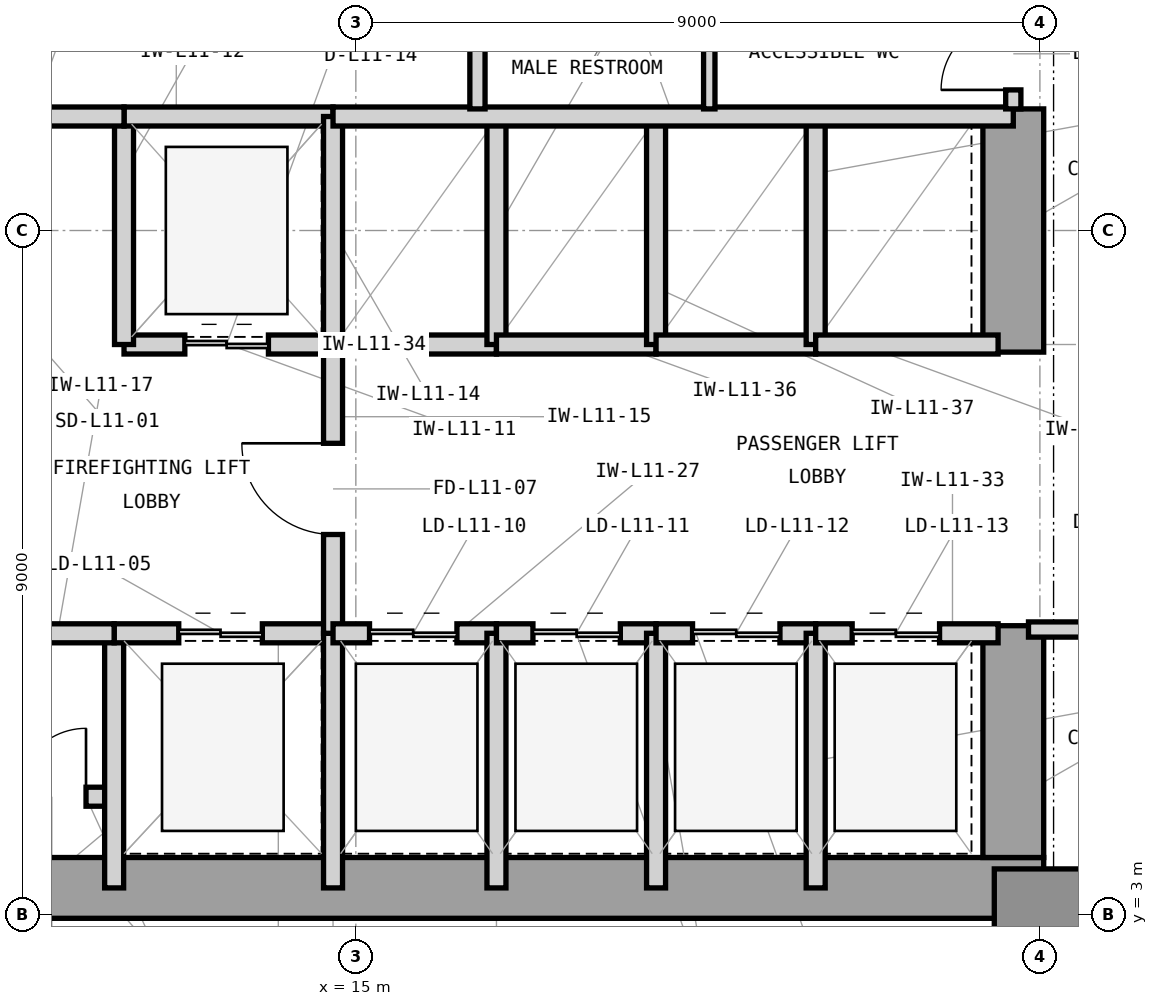
"""IFC4 building model, lengths in metres.
Left out: names, types, materials, properties, quantities, classifications, styles, units other than length and angle.
Written with IfcOpenShell. Run it as: python <this file> out.ifc"""

import sys

from ifc_helpers import new_model, si_unit, direction, frame, frame_2d, origin, origin_2d, place, context, subcontext, project, spatial, rectangle, extrude, element, fill, save


model = new_model("IFC4")
c1 = context("Model", 3, precision=1e-05, world=origin(), true_north=direction((0.0, 1.0)))
c2 = subcontext(c1, "Body", "Model", "MODEL_VIEW")
j1 = project(units=[si_unit("LENGTHUNIT", "METRE"), si_unit("PLANEANGLEUNIT", "RADIAN")], contexts=[c1])
p1 = place(None, origin())
s1 = spatial("IfcSite", under=j1, at=p1, CompositionType="ELEMENT")
p2 = place(p1, origin())
s2 = spatial("IfcBuilding", under=s1, at=p2, CompositionType="ELEMENT")
p3 = place(p2, frame((0.0, 0.0, 51.0)))
s3 = spatial("IfcBuildingStorey", under=s2, at=p3, CompositionType="ELEMENT", Elevation=51.0)
p4 = place(p3, frame((7.475, 3.35, 0.0), z_axis=(0.0, 0.0, 1.0), x_axis=(1.0, 0.0, 0.0)))
e1 = element("IfcWall", 1, at=p4, inside=s3, PredefinedType="SHEAR", context=c2, shape_type="SweptSolid", body=[
    extrude(rectangle(XDim=16.575, YDim=0.8, at=frame_2d((8.288, 0.0))), origin(), (0.0, 0.0, 1.0), 4.2),
])
p5 = place(p3, frame((23.65, 3.75, 0.0), z_axis=(0.0, 0.0, 1.0), x_axis=(0.0, 1.0, 0.0)))
e2 = element("IfcWall", 2, at=p5, inside=s3, PredefinedType="SHEAR", context=c2, shape_type="SweptSolid", body=[
    extrude(rectangle(XDim=3.05, YDim=0.8, at=frame_2d((1.525, 0.0))), origin(), (0.0, 0.0, 1.0), 4.2),
])
p6 = place(p3, frame((23.65, 10.4, 0.0), z_axis=(0.0, 0.0, 1.0), x_axis=(0.0, 1.0, 0.0)))
e3 = element("IfcWall", 3, at=p6, inside=s3, PredefinedType="SHEAR", context=c2, shape_type="SweptSolid", body=[
    extrude(rectangle(XDim=3.2, YDim=0.8, at=frame_2d((1.6, 0.0))), origin(), (0.0, 0.0, 1.0), 4.2),
])
p7 = place(p3, frame((24.0, 3.0, 0.0), z_axis=(0.0, 0.0, 1.0), x_axis=(1.0, 0.0, 0.0)))
e4 = element("IfcColumn", 4, at=p7, inside=s3, PredefinedType="COLUMN", context=c2, shape_type="SweptSolid", body=[
    extrude(rectangle(XDim=1.2, YDim=1.2, at=origin_2d()), origin(), (0.0, 0.0, 1.0), 4.2),
])
p8 = place(p3, frame((23.9, 3.21, 0.0), z_axis=(0.0, 0.0, 1.0), x_axis=(1.0, 0.0, 0.0)))
e5 = element("IfcWall", 5, at=p8, inside=s3, PredefinedType="STANDARD", context=c2, shape_type="SweptSolid", body=[
    extrude(rectangle(XDim=40.5, YDim=0.42, at=frame_2d((20.25, 0.0))), origin(), (0.0, 0.0, 1.0), 3.98),
])
p9 = place(p8, frame((1.1, 0.0, 0.85)))
e6 = element("IfcOpeningElement", 6, at=p9, cuts=e5, PredefinedType="OPENING", context=c2, shape_type="SweptSolid", body=[
    extrude(rectangle(XDim=1.2, YDim=2.45, at=frame_2d((0.6, 1.225))), frame((0.0, 0.22, 0.0), z_axis=(0.0, -1.0, 0.0), x_axis=(1.0, 0.0, 0.0)), (0.0, 0.0, 1.0), 0.44),
])
p10 = place(p8, frame((5.336, 0.0, 0.85)))
e7 = element("IfcOpeningElement", 7, at=p10, cuts=e5, PredefinedType="OPENING", context=c2, shape_type="SweptSolid", body=[
    extrude(rectangle(XDim=2.8, YDim=2.45, at=frame_2d((1.4, 1.225))), frame((0.0, 0.22, 0.0), z_axis=(0.0, -1.0, 0.0), x_axis=(1.0, 0.0, 0.0)), (0.0, 0.0, 1.0), 0.44),
])
p11 = place(p8, frame((19.086, 0.0, 0.85)))
e8 = element("IfcOpeningElement", 8, at=p11, cuts=e5, PredefinedType="OPENING", context=c2, shape_type="SweptSolid", body=[
    extrude(rectangle(XDim=2.8, YDim=2.45, at=frame_2d((1.4, 1.225))), frame((0.0, 0.22, 0.0), z_axis=(0.0, -1.0, 0.0), x_axis=(1.0, 0.0, 0.0)), (0.0, 0.0, 1.0), 0.44),
])
p12 = place(p8, frame((27.886, 0.0, 0.85)))
e9 = element("IfcOpeningElement", 9, at=p12, cuts=e5, PredefinedType="OPENING", context=c2, shape_type="SweptSolid", body=[
    extrude(rectangle(XDim=1.2, YDim=2.45, at=frame_2d((0.6, 1.225))), frame((0.0, 0.22, 0.0), z_axis=(0.0, -1.0, 0.0), x_axis=(1.0, 0.0, 0.0)), (0.0, 0.0, 1.0), 0.44),
])
p13 = place(p3, frame((10.33, 4.55, 0.0), z_axis=(0.0, 0.0, 1.0), x_axis=(1.0, 0.0, 0.0)))
e10 = element("IfcWall", 10, at=p13, inside=s3, PredefinedType="PARTITIONING", context=c2, shape_type="SweptSolid", body=[
    extrude(rectangle(XDim=1.49, YDim=0.25, at=frame_2d((0.745, 0.0))), origin(), (0.0, 0.0, 1.0), 3.97),
])
p14 = place(p13, frame((0.22, 0.0, 0.0)))
e11 = element("IfcOpeningElement", 11, at=p14, cuts=e10, PredefinedType="OPENING", context=c2, shape_type="SweptSolid", body=[
    extrude(rectangle(XDim=0.9, YDim=2.1, at=frame_2d((0.45, 1.05))), frame((0.0, 0.135, 0.0), z_axis=(0.0, -1.0, 0.0), x_axis=(1.0, 0.0, 0.0)), (0.0, 0.0, 1.0), 0.27),
])
p15 = place(p3, frame((11.82, 3.35, 0.0), z_axis=(0.0, 0.0, 1.0), x_axis=(0.0, 1.0, 0.0)))
e12 = element("IfcWall", 12, at=p15, inside=s3, PredefinedType="PARTITIONING", context=c2, shape_type="SweptSolid", body=[
    extrude(rectangle(XDim=3.35, YDim=0.25, at=frame_2d((1.675, 0.0))), origin(), (0.0, 0.0, 1.0), 3.97),
])
p16 = place(p3, frame((11.82, 6.7, 0.0), z_axis=(0.0, 0.0, 1.0), x_axis=(1.0, 0.0, 0.0)))
e13 = element("IfcWall", 13, at=p16, inside=s3, PredefinedType="PARTITIONING", context=c2, shape_type="SweptSolid", body=[
    extrude(rectangle(XDim=2.88, YDim=0.25, at=frame_2d((1.44, 0.0))), origin(), (0.0, 0.0, 1.0), 3.426),
])
p17 = place(p16, frame((0.85, 0.0, 0.0)))
e14 = element("IfcOpeningElement", 14, at=p17, cuts=e13, PredefinedType="OPENING", context=c2, shape_type="SweptSolid", body=[
    extrude(rectangle(XDim=1.1, YDim=2.25, at=frame_2d((0.55, 1.125))), frame((0.0, 0.135, 0.0), z_axis=(0.0, -1.0, 0.0), x_axis=(1.0, 0.0, 0.0)), (0.0, 0.0, 1.0), 0.27),
])
p18 = place(p3, frame((14.7, 3.35, 0.0), z_axis=(0.0, 0.0, 1.0), x_axis=(0.0, 1.0, 0.0)))
e15 = element("IfcWall", 15, at=p18, inside=s3, PredefinedType="PARTITIONING", context=c2, shape_type="SweptSolid", body=[
    extrude(rectangle(XDim=3.35, YDim=0.25, at=frame_2d((1.675, 0.0))), origin(), (0.0, 0.0, 1.0), 3.97),
])
p19 = place(p3, frame((11.95, 10.5, 0.0), z_axis=(0.0, 0.0, 1.0), x_axis=(1.0, 0.0, 0.0)))
e16 = element("IfcWall", 16, at=p19, inside=s3, PredefinedType="PARTITIONING", context=c2, shape_type="SweptSolid", body=[
    extrude(rectangle(XDim=2.75, YDim=0.25, at=frame_2d((1.375, 0.0))), origin(), (0.0, 0.0, 1.0), 3.426),
])
p20 = place(p19, frame((0.8, 0.0, 0.0)))
e17 = element("IfcOpeningElement", 17, at=p20, cuts=e16, PredefinedType="OPENING", context=c2, shape_type="SweptSolid", body=[
    extrude(rectangle(XDim=1.1, YDim=2.25, at=frame_2d((0.55, 1.125))), frame((0.0, 0.135, 0.0), z_axis=(0.0, -1.0, 0.0), x_axis=(1.0, 0.0, 0.0)), (0.0, 0.0, 1.0), 0.27),
])
p21 = place(p3, frame((11.95, 10.5, 0.0), z_axis=(0.0, 0.0, 1.0), x_axis=(0.0, 1.0, 0.0)))
e18 = element("IfcWall", 18, at=p21, inside=s3, PredefinedType="PARTITIONING", context=c2, shape_type="SweptSolid", body=[
    extrude(rectangle(XDim=3.0, YDim=0.25, at=frame_2d((1.5, 0.0))), origin(), (0.0, 0.0, 1.0), 3.97),
])
p22 = place(p3, frame((11.95, 13.5, 0.0), z_axis=(0.0, 0.0, 1.0), x_axis=(1.0, 0.0, 0.0)))
e19 = element("IfcWall", 19, at=p22, inside=s3, PredefinedType="PARTITIONING", context=c2, shape_type="SweptSolid", body=[
    extrude(rectangle(XDim=2.75, YDim=0.25, at=frame_2d((1.375, 0.0))), origin(), (0.0, 0.0, 1.0), 3.426),
])
p23 = place(p3, frame((14.7, 10.5, 0.0), z_axis=(0.0, 0.0, 1.0), x_axis=(0.0, 1.0, 0.0)))
e20 = element("IfcWall", 20, at=p23, inside=s3, PredefinedType="PARTITIONING", context=c2, shape_type="SweptSolid", body=[
    extrude(rectangle(XDim=3.0, YDim=0.25, at=frame_2d((1.5, 0.0))), origin(), (0.0, 0.0, 1.0), 3.97),
])
p24 = place(p3, frame((14.7, 6.7, 0.0), z_axis=(0.0, 0.0, 1.0), x_axis=(0.0, 1.0, 0.0)))
e21 = element("IfcWall", 21, at=p24, inside=s3, PredefinedType="PARTITIONING", context=c2, shape_type="SweptSolid", body=[
    extrude(rectangle(XDim=3.8, YDim=0.25, at=frame_2d((1.9, 0.0))), origin(), (0.0, 0.0, 1.0), 3.97),
])
p25 = place(p24, frame((1.3, 0.0, 0.0)))
e22 = element("IfcOpeningElement", 22, at=p25, cuts=e21, PredefinedType="OPENING", context=c2, shape_type="SweptSolid", body=[
    extrude(rectangle(XDim=1.2, YDim=2.2, at=frame_2d((0.6, 1.1))), frame((0.0, 0.135, 0.0), z_axis=(0.0, -1.0, 0.0), x_axis=(1.0, 0.0, 0.0)), (0.0, 0.0, 1.0), 0.27),
])
p26 = place(p3, frame((10.33, 13.5, 0.0), z_axis=(0.0, 0.0, 1.0), x_axis=(1.0, 0.0, 0.0)))
e23 = element("IfcWall", 23, at=p26, inside=s3, PredefinedType="PARTITIONING", context=c2, shape_type="SweptSolid", body=[
    extrude(rectangle(XDim=1.62, YDim=0.25, at=frame_2d((0.81, 0.0))), origin(), (0.0, 0.0, 1.0), 3.426),
])
p27 = place(p3, frame((10.33, 6.7, 0.0), z_axis=(0.0, 0.0, 1.0), x_axis=(1.0, 0.0, 0.0)))
e24 = element("IfcWall", 24, at=p27, inside=s3, PredefinedType="PARTITIONING", context=c2, shape_type="SweptSolid", body=[
    extrude(rectangle(XDim=1.49, YDim=0.25, at=frame_2d((0.745, 0.0))), origin(), (0.0, 0.0, 1.0), 3.426),
])
p28 = place(p3, frame((14.7, 6.7, 0.0), z_axis=(0.0, 0.0, 1.0), x_axis=(1.0, 0.0, 0.0)))
e25 = element("IfcWall", 25, at=p28, inside=s3, PredefinedType="PARTITIONING", context=c2, shape_type="SweptSolid", body=[
    extrude(rectangle(XDim=2.15, YDim=0.25, at=frame_2d((1.075, 0.0))), origin(), (0.0, 0.0, 1.0), 3.426),
])
p29 = place(p28, frame((0.48, 0.0, 0.0)))
e26 = element("IfcOpeningElement", 26, at=p29, cuts=e25, PredefinedType="OPENING", context=c2, shape_type="SweptSolid", body=[
    extrude(rectangle(XDim=1.15, YDim=2.25, at=frame_2d((0.575, 1.125))), frame((0.0, 0.135, 0.0), z_axis=(0.0, -1.0, 0.0), x_axis=(1.0, 0.0, 0.0)), (0.0, 0.0, 1.0), 0.27),
])
p30 = place(p3, frame((16.85, 3.35, 0.0), z_axis=(0.0, 0.0, 1.0), x_axis=(0.0, 1.0, 0.0)))
e27 = element("IfcWall", 27, at=p30, inside=s3, PredefinedType="PARTITIONING", context=c2, shape_type="SweptSolid", body=[
    extrude(rectangle(XDim=3.35, YDim=0.25, at=frame_2d((1.675, 0.0))), origin(), (0.0, 0.0, 1.0), 3.97),
])
p31 = place(p3, frame((16.85, 6.7, 0.0), z_axis=(0.0, 0.0, 1.0), x_axis=(1.0, 0.0, 0.0)))
e28 = element("IfcWall", 28, at=p31, inside=s3, PredefinedType="PARTITIONING", context=c2, shape_type="SweptSolid", body=[
    extrude(rectangle(XDim=2.1, YDim=0.25, at=frame_2d((1.05, 0.0))), origin(), (0.0, 0.0, 1.0), 3.426),
])
p32 = place(p31, frame((0.48, 0.0, 0.0)))
e29 = element("IfcOpeningElement", 29, at=p32, cuts=e28, PredefinedType="OPENING", context=c2, shape_type="SweptSolid", body=[
    extrude(rectangle(XDim=1.15, YDim=2.25, at=frame_2d((0.575, 1.125))), frame((0.0, 0.135, 0.0), z_axis=(0.0, -1.0, 0.0), x_axis=(1.0, 0.0, 0.0)), (0.0, 0.0, 1.0), 0.27),
])
p33 = place(p3, frame((18.95, 3.35, 0.0), z_axis=(0.0, 0.0, 1.0), x_axis=(0.0, 1.0, 0.0)))
e30 = element("IfcWall", 30, at=p33, inside=s3, PredefinedType="PARTITIONING", context=c2, shape_type="SweptSolid", body=[
    extrude(rectangle(XDim=3.35, YDim=0.25, at=frame_2d((1.675, 0.0))), origin(), (0.0, 0.0, 1.0), 3.97),
])
p34 = place(p3, frame((18.95, 6.7, 0.0), z_axis=(0.0, 0.0, 1.0), x_axis=(1.0, 0.0, 0.0)))
e31 = element("IfcWall", 31, at=p34, inside=s3, PredefinedType="PARTITIONING", context=c2, shape_type="SweptSolid", body=[
    extrude(rectangle(XDim=2.1, YDim=0.25, at=frame_2d((1.05, 0.0))), origin(), (0.0, 0.0, 1.0), 3.426),
])
p35 = place(p34, frame((0.48, 0.0, 0.0)))
e32 = element("IfcOpeningElement", 32, at=p35, cuts=e31, PredefinedType="OPENING", context=c2, shape_type="SweptSolid", body=[
    extrude(rectangle(XDim=1.15, YDim=2.25, at=frame_2d((0.575, 1.125))), frame((0.0, 0.135, 0.0), z_axis=(0.0, -1.0, 0.0), x_axis=(1.0, 0.0, 0.0)), (0.0, 0.0, 1.0), 0.27),
])
p36 = place(p3, frame((21.05, 3.35, 0.0), z_axis=(0.0, 0.0, 1.0), x_axis=(0.0, 1.0, 0.0)))
e33 = element("IfcWall", 33, at=p36, inside=s3, PredefinedType="PARTITIONING", context=c2, shape_type="SweptSolid", body=[
    extrude(rectangle(XDim=3.35, YDim=0.25, at=frame_2d((1.675, 0.0))), origin(), (0.0, 0.0, 1.0), 3.97),
])
p37 = place(p3, frame((21.05, 6.7, 0.0), z_axis=(0.0, 0.0, 1.0), x_axis=(1.0, 0.0, 0.0)))
e34 = element("IfcWall", 34, at=p37, inside=s3, PredefinedType="PARTITIONING", context=c2, shape_type="SweptSolid", body=[
    extrude(rectangle(XDim=2.4, YDim=0.25, at=frame_2d((1.2, 0.0))), origin(), (0.0, 0.0, 1.0), 3.426),
])
p38 = place(p37, frame((0.48, 0.0, 0.0)))
e35 = element("IfcOpeningElement", 35, at=p38, cuts=e34, PredefinedType="OPENING", context=c2, shape_type="SweptSolid", body=[
    extrude(rectangle(XDim=1.15, YDim=2.25, at=frame_2d((0.575, 1.125))), frame((0.0, 0.135, 0.0), z_axis=(0.0, -1.0, 0.0), x_axis=(1.0, 0.0, 0.0)), (0.0, 0.0, 1.0), 0.27),
])
p39 = place(p3, frame((14.7, 10.5, 0.0), z_axis=(0.0, 0.0, 1.0), x_axis=(1.0, 0.0, 0.0)))
e36 = element("IfcWall", 36, at=p39, inside=s3, PredefinedType="PARTITIONING", context=c2, shape_type="SweptSolid", body=[
    extrude(rectangle(XDim=2.15, YDim=0.25, at=frame_2d((1.075, 0.0))), origin(), (0.0, 0.0, 1.0), 3.426),
])
p40 = place(p3, frame((16.85, 10.5, 0.0), z_axis=(0.0, 0.0, 1.0), x_axis=(0.0, 1.0, 0.0)))
e37 = element("IfcWall", 37, at=p40, inside=s3, PredefinedType="PARTITIONING", context=c2, shape_type="SweptSolid", body=[
    extrude(rectangle(XDim=3.0, YDim=0.25, at=frame_2d((1.5, 0.0))), origin(), (0.0, 0.0, 1.0), 3.97),
])
p41 = place(p3, frame((16.85, 10.5, 0.0), z_axis=(0.0, 0.0, 1.0), x_axis=(1.0, 0.0, 0.0)))
e38 = element("IfcWall", 38, at=p41, inside=s3, PredefinedType="PARTITIONING", context=c2, shape_type="SweptSolid", body=[
    extrude(rectangle(XDim=2.1, YDim=0.25, at=frame_2d((1.05, 0.0))), origin(), (0.0, 0.0, 1.0), 3.426),
])
p42 = place(p3, frame((18.95, 10.5, 0.0), z_axis=(0.0, 0.0, 1.0), x_axis=(0.0, 1.0, 0.0)))
e39 = element("IfcWall", 39, at=p42, inside=s3, PredefinedType="PARTITIONING", context=c2, shape_type="SweptSolid", body=[
    extrude(rectangle(XDim=3.0, YDim=0.25, at=frame_2d((1.5, 0.0))), origin(), (0.0, 0.0, 1.0), 3.97),
])
p43 = place(p3, frame((18.95, 10.5, 0.0), z_axis=(0.0, 0.0, 1.0), x_axis=(1.0, 0.0, 0.0)))
e40 = element("IfcWall", 40, at=p43, inside=s3, PredefinedType="PARTITIONING", context=c2, shape_type="SweptSolid", body=[
    extrude(rectangle(XDim=2.1, YDim=0.25, at=frame_2d((1.05, 0.0))), origin(), (0.0, 0.0, 1.0), 3.426),
])
p44 = place(p3, frame((21.05, 10.5, 0.0), z_axis=(0.0, 0.0, 1.0), x_axis=(0.0, 1.0, 0.0)))
e41 = element("IfcWall", 41, at=p44, inside=s3, PredefinedType="PARTITIONING", context=c2, shape_type="SweptSolid", body=[
    extrude(rectangle(XDim=3.0, YDim=0.25, at=frame_2d((1.5, 0.0))), origin(), (0.0, 0.0, 1.0), 3.97),
])
p45 = place(p3, frame((21.05, 10.5, 0.0), z_axis=(0.0, 0.0, 1.0), x_axis=(1.0, 0.0, 0.0)))
e42 = element("IfcWall", 42, at=p45, inside=s3, PredefinedType="PARTITIONING", context=c2, shape_type="SweptSolid", body=[
    extrude(rectangle(XDim=2.4, YDim=0.25, at=frame_2d((1.2, 0.0))), origin(), (0.0, 0.0, 1.0), 3.426),
])
p46 = place(p3, frame((14.7, 13.5, 0.0), z_axis=(0.0, 0.0, 1.0), x_axis=(1.0, 0.0, 0.0)))
e43 = element("IfcWall", 43, at=p46, inside=s3, PredefinedType="PARTITIONING", context=c2, shape_type="SweptSolid", body=[
    extrude(rectangle(XDim=8.95, YDim=0.25, at=frame_2d((4.475, 0.0))), origin(), (0.0, 0.0, 1.0), 3.426),
])
p47 = place(p3, frame((16.6, 13.6, 0.0), z_axis=(0.0, 0.0, 1.0), x_axis=(0.0, 1.0, 0.0)))
e44 = element("IfcWall", 44, at=p47, inside=s3, PredefinedType="PARTITIONING", context=c2, shape_type="SweptSolid", body=[
    extrude(rectangle(XDim=3.0, YDim=0.2, at=frame_2d((1.5, 0.0))), origin(), (0.0, 0.0, 1.0), 3.97),
])
p48 = place(p47, frame((1.02, 0.0, 0.0)))
e45 = element("IfcOpeningElement", 45, at=p48, cuts=e44, PredefinedType="OPENING", context=c2, shape_type="SweptSolid", body=[
    extrude(rectangle(XDim=0.95, YDim=2.1, at=frame_2d((0.475, 1.05))), frame((0.0, 0.11, 0.0), z_axis=(0.0, -1.0, 0.0), x_axis=(1.0, 0.0, 0.0)), (0.0, 0.0, 1.0), 0.22),
])
p49 = place(p3, frame((19.65, 13.6, 0.0), z_axis=(0.0, 0.0, 1.0), x_axis=(0.0, 1.0, 0.0)))
e46 = element("IfcWall", 46, at=p49, inside=s3, PredefinedType="PARTITIONING", context=c2, shape_type="SweptSolid", body=[
    extrude(rectangle(XDim=3.0, YDim=0.15, at=frame_2d((1.5, 0.0))), origin(), (0.0, 0.0, 1.0), 3.97),
])
p50 = place(p3, frame((23.65, 13.6, 0.0), z_axis=(0.0, 0.0, 1.0), x_axis=(0.0, 1.0, 0.0)))
e47 = element("IfcWall", 47, at=p50, inside=s3, PredefinedType="PARTITIONING", context=c2, shape_type="SweptSolid", body=[
    extrude(rectangle(XDim=3.0, YDim=0.2, at=frame_2d((1.5, 0.0))), origin(), (0.0, 0.0, 1.0), 3.97),
])
p51 = place(p50, frame((0.25, 0.0, 0.0)))
e48 = element("IfcOpeningElement", 48, at=p51, cuts=e47, PredefinedType="OPENING", context=c2, shape_type="SweptSolid", body=[
    extrude(rectangle(XDim=0.95, YDim=2.1, at=frame_2d((0.475, 1.05))), frame((0.0, 0.11, 0.0), z_axis=(0.0, -1.0, 0.0), x_axis=(1.0, 0.0, 0.0)), (0.0, 0.0, 1.0), 0.22),
])
p52 = place(p50, frame((1.8, 0.0, 0.0)))
e49 = element("IfcOpeningElement", 49, at=p52, cuts=e47, PredefinedType="OPENING", context=c2, shape_type="SweptSolid", body=[
    extrude(rectangle(XDim=0.95, YDim=2.1, at=frame_2d((0.475, 1.05))), frame((0.0, 0.11, 0.0), z_axis=(0.0, -1.0, 0.0), x_axis=(1.0, 0.0, 0.0)), (0.0, 0.0, 1.0), 0.22),
])
p53 = place(p3, frame((23.85, 6.75, 0.0), z_axis=(0.0, 0.0, 1.0), x_axis=(1.0, 0.0, 0.0)))
e50 = element("IfcWall", 50, at=p53, inside=s3, PredefinedType="PARTITIONING", context=c2, shape_type="SweptSolid", body=[
    extrude(rectangle(XDim=2.85, YDim=0.2, at=frame_2d((1.425, 0.0))), origin(), (0.0, 0.0, 1.0), 3.97),
])
p54 = place(p53, frame((0.7, 0.0, 0.0)))
e51 = element("IfcOpeningElement", 51, at=p54, cuts=e50, PredefinedType="OPENING", context=c2, shape_type="SweptSolid", body=[
    extrude(rectangle(XDim=1.0, YDim=2.15, at=frame_2d((0.5, 1.075))), frame((0.0, 0.11, 0.0), z_axis=(0.0, -1.0, 0.0), x_axis=(1.0, 0.0, 0.0)), (0.0, 0.0, 1.0), 0.22),
])
p55 = place(p14, origin())
e52 = element("IfcDoor", 52, at=p55, inside=s3, OperationType="SINGLE_SWING_RIGHT", PredefinedType="TRAPDOOR", context=c2, shape_type="SweptSolid", body=[
    extrude(rectangle(XDim=0.9, YDim=2.1, at=frame_2d((0.45, 1.05))), frame((0.0, 0.025, 0.0), z_axis=(0.0, -1.0, 0.0), x_axis=(1.0, 0.0, 0.0)), (0.0, 0.0, 1.0), 0.05),
])
fill(e11, e52)
p56 = place(p17, origin())
e53 = element("IfcDoor", 53, at=p56, inside=s3, OperationType="DOUBLE_DOOR_SLIDING", PredefinedType="DOOR", context=c2, shape_type="SweptSolid", body=[
    extrude(rectangle(XDim=1.1, YDim=2.25, at=frame_2d((0.55, 1.125))), frame((0.0, 0.025, 0.0), z_axis=(0.0, -1.0, 0.0), x_axis=(1.0, 0.0, 0.0)), (0.0, 0.0, 1.0), 0.05),
])
fill(e14, e53)
p57 = place(p20, origin())
e54 = element("IfcDoor", 54, at=p57, inside=s3, OperationType="DOUBLE_DOOR_SLIDING", PredefinedType="DOOR", context=c2, shape_type="SweptSolid", body=[
    extrude(rectangle(XDim=1.1, YDim=2.25, at=frame_2d((0.55, 1.125))), frame((0.0, 0.025, 0.0), z_axis=(0.0, -1.0, 0.0), x_axis=(1.0, 0.0, 0.0)), (0.0, 0.0, 1.0), 0.05),
])
fill(e17, e54)
p58 = place(p25, origin())
e55 = element("IfcDoor", 55, at=p58, inside=s3, OperationType="SINGLE_SWING_RIGHT", PredefinedType="DOOR", context=c2, shape_type="SweptSolid", body=[
    extrude(rectangle(XDim=1.2, YDim=2.2, at=frame_2d((0.6, 1.1))), frame((0.0, 0.025, 0.0), z_axis=(0.0, -1.0, 0.0), x_axis=(1.0, 0.0, 0.0)), (0.0, 0.0, 1.0), 0.05),
])
fill(e22, e55)
p59 = place(p29, origin())
e56 = element("IfcDoor", 56, at=p59, inside=s3, OperationType="DOUBLE_DOOR_SLIDING", PredefinedType="DOOR", context=c2, shape_type="SweptSolid", body=[
    extrude(rectangle(XDim=1.15, YDim=2.25, at=frame_2d((0.575, 1.125))), frame((0.0, 0.025, 0.0), z_axis=(0.0, -1.0, 0.0), x_axis=(1.0, 0.0, 0.0)), (0.0, 0.0, 1.0), 0.05),
])
fill(e26, e56)
p60 = place(p32, origin())
e57 = element("IfcDoor", 57, at=p60, inside=s3, OperationType="DOUBLE_DOOR_SLIDING", PredefinedType="DOOR", context=c2, shape_type="SweptSolid", body=[
    extrude(rectangle(XDim=1.15, YDim=2.25, at=frame_2d((0.575, 1.125))), frame((0.0, 0.025, 0.0), z_axis=(0.0, -1.0, 0.0), x_axis=(1.0, 0.0, 0.0)), (0.0, 0.0, 1.0), 0.05),
])
fill(e29, e57)
p61 = place(p35, origin())
e58 = element("IfcDoor", 58, at=p61, inside=s3, OperationType="DOUBLE_DOOR_SLIDING", PredefinedType="DOOR", context=c2, shape_type="SweptSolid", body=[
    extrude(rectangle(XDim=1.15, YDim=2.25, at=frame_2d((0.575, 1.125))), frame((0.0, 0.025, 0.0), z_axis=(0.0, -1.0, 0.0), x_axis=(1.0, 0.0, 0.0)), (0.0, 0.0, 1.0), 0.05),
])
fill(e32, e58)
p62 = place(p38, origin())
e59 = element("IfcDoor", 59, at=p62, inside=s3, OperationType="DOUBLE_DOOR_SLIDING", PredefinedType="DOOR", context=c2, shape_type="SweptSolid", body=[
    extrude(rectangle(XDim=1.15, YDim=2.25, at=frame_2d((0.575, 1.125))), frame((0.0, 0.025, 0.0), z_axis=(0.0, -1.0, 0.0), x_axis=(1.0, 0.0, 0.0)), (0.0, 0.0, 1.0), 0.05),
])
fill(e35, e59)
p63 = place(p51, origin())
e60 = element("IfcDoor", 60, at=p63, inside=s3, OperationType="SINGLE_SWING_LEFT", PredefinedType="DOOR", context=c2, shape_type="SweptSolid", body=[
    extrude(rectangle(XDim=0.95, YDim=2.1, at=frame_2d((0.475, 1.05))), frame((0.0, 0.025, 0.0), z_axis=(0.0, -1.0, 0.0), x_axis=(1.0, 0.0, 0.0)), (0.0, 0.0, 1.0), 0.05),
])
fill(e48, e60)
save(model, sys.argv[1])
